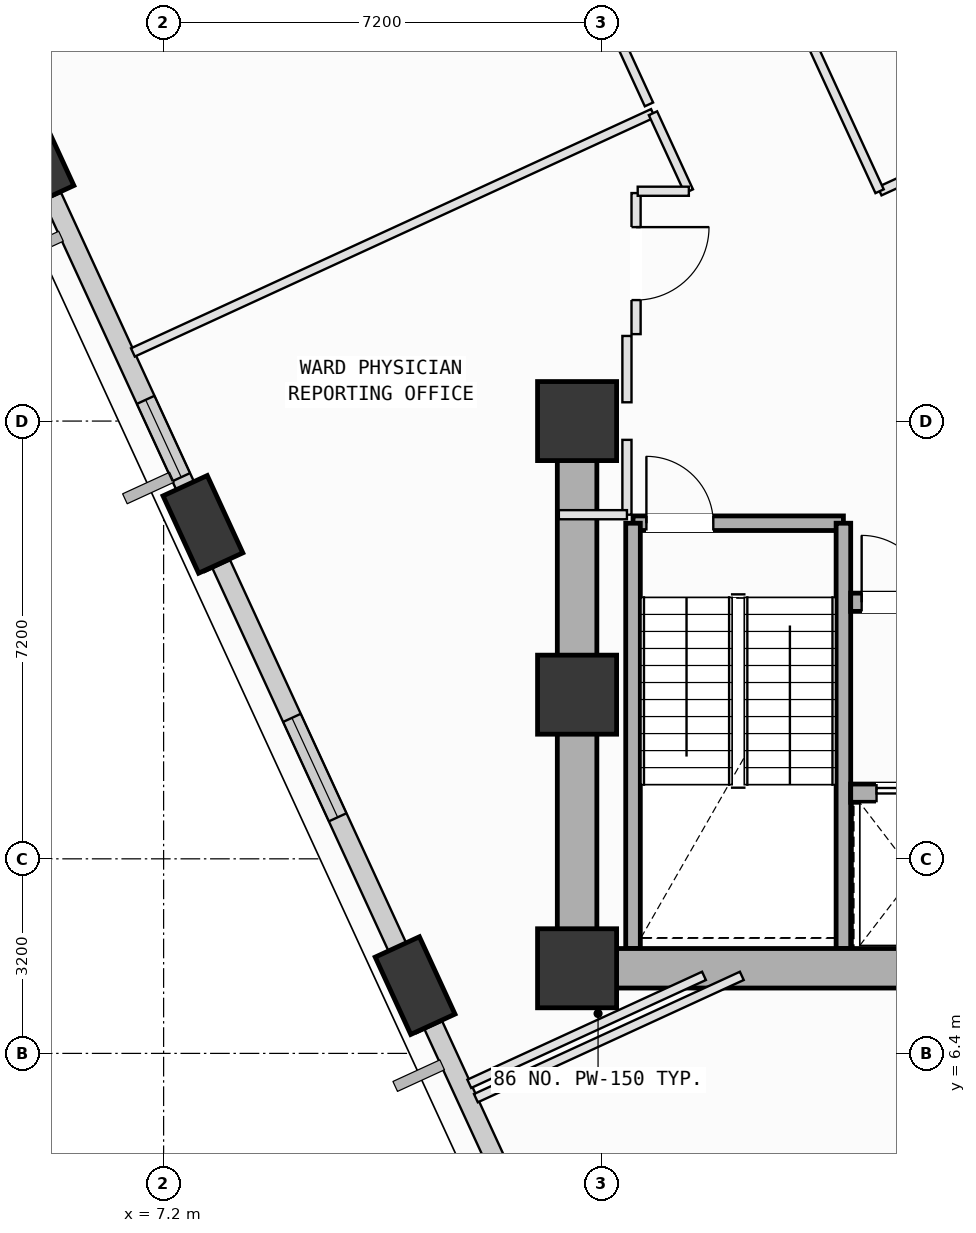
"""IFC4 building model, lengths in metres.
Left out: names, types, materials, properties, quantities, classifications, styles, units other than length and angle.
Written with IfcOpenShell. Run it as: python <this file> out.ifc"""

import sys

from ifc_helpers import new_model, si_unit, direction, frame, frame_2d, origin, origin_2d, place, context, subcontext, project, spatial, rectangle, extrude, element, fill, save


model = new_model("IFC4")
c1 = context("Model", 3, precision=1e-05, world=origin(), true_north=direction((0.0, 1.0)))
c2 = subcontext(c1, "Body", "Model", "MODEL_VIEW")
j1 = project(units=[si_unit("LENGTHUNIT", "METRE"), si_unit("PLANEANGLEUNIT", "RADIAN")], contexts=[c1])
p1 = place(None, origin())
s1 = spatial("IfcSite", under=j1, at=p1, CompositionType="ELEMENT")
p2 = place(p1, origin())
s2 = spatial("IfcBuilding", under=s1, at=p2, CompositionType="ELEMENT")
p3 = place(p2, frame((0.0, 0.0, 128.4)))
s3 = spatial("IfcBuildingStorey", under=s2, at=p3, CompositionType="ELEMENT", Elevation=128.4)
for number, where, z_axis, x_axis in (
    (1, (14.0, 7.8, 0.0), (0.0, 0.0, 1.0), (1.0, 0.0, 0.0)),
    (2, (14.0, 12.3, 0.0), (0.0, 0.0, 1.0), (1.0, 0.0, 0.0)),
    (3, (14.0, 16.8, 0.0), (0.0, 0.0, 1.0), (1.0, 0.0, 0.0)),
):
    element("IfcColumn", number, at=place(p3, frame(where, z_axis=z_axis, x_axis=x_axis)), inside=s3, PredefinedType="COLUMN", context=c2, shape_type="SweptSolid", body=[
        extrude(rectangle(XDim=1.3, YDim=1.3, at=origin_2d()), origin(), (0.0, 0.0, 1.0), 4.0),
    ])
p4 = place(p3, frame((5.068, 21.143, 0.002), z_axis=(0.016014588508, -0.117318993088, 0.992965148842), x_axis=(-0.536039138847, 0.837311135959, 0.107573710648)))
e4 = element("IfcColumn", 4, at=p4, inside=s3, PredefinedType="COLUMN", context=c2, shape_type="SweptSolid", body=[
    extrude(rectangle(XDim=1.4, YDim=0.8, at=origin_2d()), origin(), (0.0, 0.0, 1.0), 4.025),
])
p5 = place(p3, frame((7.847, 15.101, 0.002), z_axis=(0.040849580796, -0.105674769935, 0.993561349262), x_axis=(-0.715220921061, 0.691277435533, 0.102929787717)))
e5 = element("IfcColumn", 5, at=p5, inside=s3, PredefinedType="COLUMN", context=c2, shape_type="SweptSolid", body=[
    extrude(rectangle(XDim=1.4, YDim=0.8, at=origin_2d()), origin(), (0.0, 0.0, 1.0), 4.022),
])
p6 = place(p3, frame((11.336, 7.515, 0.002), z_axis=(0.07190388541, -0.091078254852, 0.993244472804), x_axis=(-0.887125530949, 0.449326285156, 0.105423819915)))
e6 = element("IfcColumn", 6, at=p6, inside=s3, PredefinedType="COLUMN", context=c2, shape_type="SweptSolid", body=[
    extrude(rectangle(XDim=1.4, YDim=0.8, at=origin_2d()), origin(), (0.0, 0.0, 1.0), 4.023),
])
p7 = place(p3, frame((7.735, 15.345, 0.0), z_axis=(0.0, 0.0, 1.0), x_axis=(-0.417898490709, 0.908493726706, 0.0)))
e7 = element("IfcWall", 7, at=p7, inside=s3, PredefinedType="SOLIDWALL", context=c2, shape_type="SweptSolid", body=[
    extrude(rectangle(XDim=5.662, YDim=0.32, at=frame_2d((2.831, 0.0))), origin(), (0.0, 0.0, 1.0), 3.165),
])
p8 = place(p7, frame((0.586, 0.0, 0.75)))
e8 = element("IfcOpeningElement", 8, at=p8, cuts=e7, PredefinedType="OPENING", context=c2, shape_type="SweptSolid", body=[
    extrude(rectangle(XDim=1.4, YDim=1.85, at=frame_2d((0.7, 0.925))), frame((0.0, 0.17, 0.0), z_axis=(0.0, -1.0, 0.0), x_axis=(1.0, 0.0, 0.0)), (0.0, 0.0, 1.0), 0.34),
])
p9 = place(p3, frame((11.225, 7.757, 0.0), z_axis=(0.0, 0.0, 1.0), x_axis=(-0.417879873404, 0.908502290258, 0.0)))
e9 = element("IfcWall", 9, at=p9, inside=s3, PredefinedType="SOLIDWALL", context=c2, shape_type="SweptSolid", body=[
    extrude(rectangle(XDim=7.36, YDim=0.32, at=frame_2d((3.68, 0.0))), origin(), (0.0, 0.0, 1.0), 3.165),
])
p10 = place(p9, frame((2.781, 0.0, 0.75)))
e10 = element("IfcOpeningElement", 10, at=p10, cuts=e9, PredefinedType="OPENING", context=c2, shape_type="SweptSolid", body=[
    extrude(rectangle(XDim=1.8, YDim=2.05, at=frame_2d((0.9, 1.025))), frame((0.0, 0.17, 0.0), z_axis=(0.0, -1.0, 0.0), x_axis=(1.0, 0.0, 0.0)), (0.0, 0.0, 1.0), 0.34),
])
p11 = place(p3, frame((14.237, 1.207, 0.0), z_axis=(0.0, 0.0, 1.0), x_axis=(-0.417868697018, 0.908507430928, 0.0)))
e11 = element("IfcWall", 11, at=p11, inside=s3, PredefinedType="SOLIDWALL", context=c2, shape_type="SweptSolid", body=[
    extrude(rectangle(XDim=6.223, YDim=0.32, at=frame_2d((3.112, 0.0))), origin(), (0.0, 0.0, 1.0), 3.165),
])
p12 = place(p11, frame((1.72, 0.0, 0.75)))
e12 = element("IfcOpeningElement", 12, at=p12, cuts=e11, PredefinedType="OPENING", context=c2, shape_type="SweptSolid", body=[
    extrude(rectangle(XDim=1.2, YDim=1.75, at=frame_2d((0.6, 0.875))), frame((0.0, 0.17, 0.0), z_axis=(0.0, -1.0, 0.0), x_axis=(1.0, 0.0, 0.0)), (0.0, 0.0, 1.0), 0.34),
])
p13 = place(p3, frame((14.92, 15.12, 0.0), z_axis=(0.0, 0.0, 1.0), x_axis=(1.0, 0.0, 0.0)))
e13 = element("IfcWall", 13, at=p13, inside=s3, PredefinedType="SOLIDWALL", context=c2, shape_type="SweptSolid", body=[
    extrude(rectangle(XDim=3.46, YDim=0.24, at=frame_2d((1.73, 0.0))), origin(), (0.0, 0.0, 1.0), 3.78),
])
p14 = place(p13, frame((0.22, 0.0, 0.0)))
e14 = element("IfcOpeningElement", 14, at=p14, cuts=e13, PredefinedType="OPENING", context=c2, shape_type="SweptSolid", body=[
    extrude(rectangle(XDim=1.1, YDim=2.15, at=frame_2d((0.55, 1.075))), frame((0.0, 0.13, 0.0), z_axis=(0.0, -1.0, 0.0), x_axis=(1.0, 0.0, 0.0)), (0.0, 0.0, 1.0), 0.26),
])
for number, where, z_axis, x_axis in (
    (15, (18.38, 15.12, 0.0), (0.0, 0.0, 1.0), (0.0, -1.0, 0.0)),
    (16, (14.92, 8.125, 0.0), (0.0, 0.0, 1.0), (0.0, 1.0, 0.0)),
):
    element("IfcWall", number, at=place(p3, frame(where, z_axis=z_axis, x_axis=x_axis)), inside=s3, PredefinedType="SOLIDWALL", context=c2, shape_type="SweptSolid", body=[
        extrude(rectangle(XDim=6.995, YDim=0.24, at=frame_2d((3.498, 0.0))), origin(), (0.0, 0.0, 1.0), 3.78),
    ])
p15 = place(p3, frame((14.0, 7.8, 0.0), z_axis=(0.0, 0.0, 1.0), x_axis=(1.0, 0.0, 0.0)))
e17 = element("IfcWall", 17, at=p15, inside=s3, PredefinedType="SHEAR", context=c2, shape_type="SweptSolid", body=[
    extrude(rectangle(XDim=10.8, YDim=0.65, at=frame_2d((5.4, 0.0))), origin(), (0.0, 0.0, 1.0), 3.78),
])
p16 = place(p3, frame((14.0, 16.8, 0.0), z_axis=(0.0, 0.0, 1.0), x_axis=(0.0, -1.0, 0.0)))
e18 = element("IfcWall", 18, at=p16, inside=s3, PredefinedType="SHEAR", context=c2, shape_type="SweptSolid", body=[
    extrude(rectangle(XDim=9.0, YDim=0.65, at=frame_2d((4.5, 0.0))), origin(), (0.0, 0.0, 1.0), 3.78),
])
p17 = place(p3, frame((18.5, 10.68, 0.0), z_axis=(0.0, 0.0, 1.0), x_axis=(1.0, 0.0, 0.0)))
e19 = element("IfcWall", 19, at=p17, inside=s3, PredefinedType="SOLIDWALL", context=c2, shape_type="SweptSolid", body=[
    extrude(rectangle(XDim=5.3, YDim=0.3, at=frame_2d((2.65, 0.0))), origin(), (0.0, 0.0, 1.0), 3.78),
])
p18 = place(p17, frame((4.22, 0.0, 0.0)))
e20 = element("IfcOpeningElement", 20, at=p18, cuts=e19, PredefinedType="OPENING", context=c2, shape_type="SweptSolid", body=[
    extrude(rectangle(XDim=0.86, YDim=2.06, at=frame_2d((0.43, 1.03))), frame((0.0, 0.16, 0.0), z_axis=(0.0, -1.0, 0.0), x_axis=(1.0, 0.0, 0.0)), (0.0, 0.0, 1.0), 0.32),
])
p19 = place(p17, frame((0.425, 0.0, 0.0)))
e21 = element("IfcOpeningElement", 21, at=p19, cuts=e19, PredefinedType="OPENING", context=c2, shape_type="SweptSolid", body=[
    extrude(rectangle(XDim=1.25, YDim=2.18, at=frame_2d((0.625, 1.09))), frame((0.0, 0.16, 0.0), z_axis=(0.0, -1.0, 0.0), x_axis=(1.0, 0.0, 0.0)), (0.0, 0.0, 1.0), 0.32),
])
p20 = place(p17, frame((2.525, 0.0, 0.0)))
e22 = element("IfcOpeningElement", 22, at=p20, cuts=e19, PredefinedType="OPENING", context=c2, shape_type="SweptSolid", body=[
    extrude(rectangle(XDim=1.25, YDim=2.18, at=frame_2d((0.625, 1.09))), frame((0.0, 0.16, 0.0), z_axis=(0.0, -1.0, 0.0), x_axis=(1.0, 0.0, 0.0)), (0.0, 0.0, 1.0), 0.32),
])
p21 = place(p3, frame((18.5, 13.82, 0.0), z_axis=(0.0, 0.0, 1.0), x_axis=(1.0, 0.0, 0.0)))
e23 = element("IfcWall", 23, at=p21, inside=s3, PredefinedType="SOLIDWALL", context=c2, shape_type="SweptSolid", body=[
    extrude(rectangle(XDim=5.3, YDim=0.3, at=frame_2d((2.65, 0.0))), origin(), (0.0, 0.0, 1.0), 3.78),
])
p22 = place(p21, frame((0.18, 0.0, 0.0)))
e24 = element("IfcOpeningElement", 24, at=p22, cuts=e23, PredefinedType="OPENING", context=c2, shape_type="SweptSolid", body=[
    extrude(rectangle(XDim=1.1, YDim=2.15, at=frame_2d((0.55, 1.075))), frame((0.0, 0.16, 0.0), z_axis=(0.0, -1.0, 0.0), x_axis=(1.0, 0.0, 0.0)), (0.0, 0.0, 1.0), 0.32),
])
p23 = place(p3, frame((12.336, 5.664, 0.0), z_axis=(0.0, 0.0, 1.0), x_axis=(0.908538975246, 0.417800108257, 0.0)))
e25 = element("IfcWall", 25, at=p23, inside=s3, PredefinedType="PARTITIONING", context=c2, shape_type="SweptSolid", body=[
    extrude(rectangle(XDim=4.813, YDim=0.15, at=frame_2d((2.407, 0.0))), origin(), (0.0, 0.0, 1.0), 3.78),
])
p24 = place(p3, frame((14.97, 20.55, 0.0), z_axis=(0.0, 0.0, 1.0), x_axis=(0.0, -1.0, 0.0)))
e26 = element("IfcWall", 26, at=p24, inside=s3, PredefinedType="PARTITIONING", context=c2, shape_type="SweptSolid", body=[
    extrude(rectangle(XDim=2.32, YDim=0.15, at=frame_2d((1.16, 0.0))), origin(), (0.0, 0.0, 1.0), 2.965),
])
p25 = place(p24, frame((0.56, 0.0, 0.0)))
e27 = element("IfcOpeningElement", 27, at=p25, cuts=e26, PredefinedType="OPENING", context=c2, shape_type="SweptSolid", body=[
    extrude(rectangle(XDim=1.2, YDim=2.15, at=frame_2d((0.6, 1.075))), frame((0.0, 0.085, 0.0), z_axis=(0.0, -1.0, 0.0), x_axis=(1.0, 0.0, 0.0)), (0.0, 0.0, 1.0), 0.17),
])
p26 = place(p3, frame((14.82, 18.2, 0.0), z_axis=(0.0, 0.0, 1.0), x_axis=(0.0, -1.0, 0.0)))
e28 = element("IfcWall", 28, at=p26, inside=s3, PredefinedType="PARTITIONING", context=c2, shape_type="SweptSolid", body=[
    extrude(rectangle(XDim=1.091, YDim=0.15, at=frame_2d((0.545, 0.0))), origin(), (0.0, 0.0, 1.0), 3.78),
])
p27 = place(p3, frame((14.82, 16.491, 0.0), z_axis=(0.0, 0.0, 1.0), x_axis=(0.0, -1.0, 0.0)))
e29 = element("IfcWall", 29, at=p27, inside=s3, PredefinedType="PARTITIONING", context=c2, shape_type="SweptSolid", body=[
    extrude(rectangle(XDim=1.231, YDim=0.15, at=frame_2d((0.615, 0.0))), origin(), (0.0, 0.0, 1.0), 3.78),
])
p28 = place(p3, frame((14.82, 15.26, 0.0), z_axis=(0.0, 0.0, 1.0), x_axis=(-1.0, 0.0, 0.0)))
e30 = element("IfcWall", 30, at=p28, inside=s3, PredefinedType="PARTITIONING", context=c2, shape_type="SweptSolid", body=[
    extrude(rectangle(XDim=1.12, YDim=0.15, at=frame_2d((0.56, 0.0))), origin(), (0.0, 0.0, 1.0), 3.78),
])
p29 = place(p3, frame((16.087, 7.675, 0.0), z_axis=(0.0, 0.0, 1.0), x_axis=(-0.90852535741, -0.417829720033, 0.0)))
e31 = element("IfcWall", 31, at=p29, inside=s3, PredefinedType="PARTITIONING", context=c2, shape_type="SweptSolid", body=[
    extrude(rectangle(XDim=4.249, YDim=0.15, at=frame_2d((2.124, 0.0))), origin(), (0.0, 0.0, 1.0), 3.78),
])
p30 = place(p3, frame((11.428, 6.765, 0.0), z_axis=(0.0, 0.0, 1.0), x_axis=(-0.417660387522, 0.908603214112, 0.0)))
e32 = element("IfcWall", 32, at=p30, inside=s3, PredefinedType="PARTITIONING", context=c2, shape_type="SweptSolid", body=[
    extrude(rectangle(XDim=0.986, YDim=0.15, at=frame_2d((0.493, 0.0))), origin(), (0.0, 0.0, 1.0), 3.165),
])
p31 = place(p3, frame((7.94, 14.347, 0.0), z_axis=(0.0, 0.0, 1.0), x_axis=(-0.417966484474, 0.908462447136, 0.0)))
e33 = element("IfcWall", 33, at=p31, inside=s3, PredefinedType="PARTITIONING", context=c2, shape_type="SweptSolid", body=[
    extrude(rectangle(XDim=0.993, YDim=0.15, at=frame_2d((0.497, 0.0))), origin(), (0.0, 0.0, 1.0), 3.165),
])
p32 = place(p3, frame((6.695, 17.929, 0.0), z_axis=(0.0, 0.0, 1.0), x_axis=(0.908502070269, 0.417880351677, 0.0)))
e34 = element("IfcWall", 34, at=p32, inside=s3, PredefinedType="PARTITIONING", context=c2, shape_type="SweptSolid", body=[
    extrude(rectangle(XDim=9.414, YDim=0.15, at=frame_2d((4.707, 0.0))), origin(), (0.0, 0.0, 1.0), 3.78),
])
p33 = place(p3, frame((15.248, 21.863, 0.0), z_axis=(0.0, 0.0, 1.0), x_axis=(0.417720087302, -0.908575769358, 0.0)))
e35 = element("IfcWall", 35, at=p33, inside=s3, PredefinedType="PARTITIONING", context=c2, shape_type="SweptSolid", body=[
    extrude(rectangle(XDim=1.412, YDim=0.15, at=frame_2d((0.706, 0.0))), origin(), (0.0, 0.0, 1.0), 3.78),
])
p34 = place(p3, frame((15.838, 20.58, 0.0), z_axis=(0.0, 0.0, 1.0), x_axis=(-1.0, 0.0, 0.0)))
e36 = element("IfcWall", 36, at=p34, inside=s3, PredefinedType="PARTITIONING", context=c2, shape_type="SweptSolid", body=[
    extrude(rectangle(XDim=0.841, YDim=0.15, at=frame_2d((0.42, 0.0))), origin(), (0.0, 0.0, 1.0), 3.78),
])
p35 = place(p3, frame((9.649, 34.037, 0.0), z_axis=(0.0, 0.0, 1.0), x_axis=(0.417880345161, -0.908502073266, 0.0)))
e37 = element("IfcWall", 37, at=p35, inside=s3, PredefinedType="PARTITIONING", context=c2, shape_type="SweptSolid", body=[
    extrude(rectangle(XDim=13.24, YDim=0.15, at=frame_2d((6.62, 0.0))), origin(), (0.0, 0.0, 1.0), 2.965),
])
p36 = place(p35, frame((6.02, 0.0, 0.0)))
e38 = element("IfcOpeningElement", 38, at=p36, cuts=e37, PredefinedType="OPENING", context=c2, shape_type="SweptSolid", body=[
    extrude(rectangle(XDim=1.2, YDim=2.15, at=frame_2d((0.6, 1.075))), frame((0.0, 0.085, 0.0), z_axis=(0.0, -1.0, 0.0), x_axis=(1.0, 0.0, 0.0)), (0.0, 0.0, 1.0), 0.17),
])
p37 = place(p3, frame((19.424, 20.786, 0.0), z_axis=(0.0, 0.0, 1.0), x_axis=(-0.909041417837, -0.416705772287, 0.0)))
e39 = element("IfcWall", 39, at=p37, inside=s3, PredefinedType="PARTITIONING", context=c2, shape_type="SweptSolid", body=[
    extrude(rectangle(XDim=0.494, YDim=0.15, at=frame_2d((0.247, 0.0))), origin(), (0.0, 0.0, 1.0), 3.78),
])
p38 = place(p3, frame((18.975, 20.58, 0.0), z_axis=(0.0, 0.0, 1.0), x_axis=(-0.417888630953, 0.908498262035, 0.0)))
e40 = element("IfcWall", 40, at=p38, inside=s3, PredefinedType="PARTITIONING", context=c2, shape_type="SweptSolid", body=[
    extrude(rectangle(XDim=9.733, YDim=0.15, at=frame_2d((4.866, 0.0))), origin(), (0.0, 0.0, 1.0), 3.78),
])
p39 = place(p38, frame((4.266, 0.0, 0.0)))
e41 = element("IfcOpeningElement", 41, at=p39, cuts=e40, PredefinedType="OPENING", context=c2, shape_type="SweptSolid", body=[
    extrude(rectangle(XDim=1.2, YDim=2.15, at=frame_2d((0.6, 1.075))), frame((0.0, 0.085, 0.0), z_axis=(0.0, -1.0, 0.0), x_axis=(1.0, 0.0, 0.0)), (0.0, 0.0, 1.0), 0.17),
])
p40 = place(p8, origin())
e42 = element("IfcWindow", 42, at=p40, inside=s3, PartitioningType="SINGLE_PANEL", PredefinedType="WINDOW", context=c2, shape_type="SweptSolid", body=[
    extrude(rectangle(XDim=1.4, YDim=1.85, at=frame_2d((0.7, 0.925))), frame((0.0, 0.03, 0.0), z_axis=(0.0, -1.0, 0.0), x_axis=(1.0, 0.0, 0.0)), (0.0, 0.0, 1.0), 0.06),
])
fill(e8, e42)
p41 = place(p10, origin())
e43 = element("IfcWindow", 43, at=p41, inside=s3, PartitioningType="SINGLE_PANEL", PredefinedType="WINDOW", context=c2, shape_type="SweptSolid", body=[
    extrude(rectangle(XDim=1.8, YDim=2.05, at=frame_2d((0.9, 1.025))), frame((0.0, 0.03, 0.0), z_axis=(0.0, -1.0, 0.0), x_axis=(1.0, 0.0, 0.0)), (0.0, 0.0, 1.0), 0.06),
])
fill(e10, e43)
p42 = place(p14, origin())
e44 = element("IfcDoor", 44, at=p42, inside=s3, OperationType="SINGLE_SWING_LEFT", PredefinedType="DOOR", context=c2, shape_type="SweptSolid", body=[
    extrude(rectangle(XDim=1.1, YDim=2.15, at=frame_2d((0.55, 1.075))), frame((0.0, 0.025, 0.0), z_axis=(0.0, -1.0, 0.0), x_axis=(1.0, 0.0, 0.0)), (0.0, 0.0, 1.0), 0.05),
])
fill(e14, e44)
p43 = place(p22, origin())
e45 = element("IfcDoor", 45, at=p43, inside=s3, OperationType="SINGLE_SWING_LEFT", PredefinedType="DOOR", context=c2, shape_type="SweptSolid", body=[
    extrude(rectangle(XDim=1.1, YDim=2.15, at=frame_2d((0.55, 1.075))), frame((0.0, 0.025, 0.0), z_axis=(0.0, -1.0, 0.0), x_axis=(1.0, 0.0, 0.0)), (0.0, 0.0, 1.0), 0.05),
])
fill(e24, e45)
p44 = place(p19, origin())
e46 = element("IfcDoor", 46, at=p44, inside=s3, OperationType="DOUBLE_DOOR_SLIDING", PredefinedType="DOOR", context=c2, shape_type="SweptSolid", body=[
    extrude(rectangle(XDim=1.25, YDim=2.18, at=frame_2d((0.625, 1.09))), frame((0.0, 0.025, 0.0), z_axis=(0.0, -1.0, 0.0), x_axis=(1.0, 0.0, 0.0)), (0.0, 0.0, 1.0), 0.05),
])
fill(e21, e46)
p45 = place(p25, origin())
e47 = element("IfcDoor", 47, at=p45, inside=s3, OperationType="SINGLE_SWING_LEFT", PredefinedType="DOOR", context=c2, shape_type="SweptSolid", body=[
    extrude(rectangle(XDim=1.2, YDim=2.15, at=frame_2d((0.6, 1.075))), frame((0.0, 0.025, 0.0), z_axis=(0.0, -1.0, 0.0), x_axis=(1.0, 0.0, 0.0)), (0.0, 0.0, 1.0), 0.05),
])
fill(e27, e47)
save(model, sys.argv[1])
